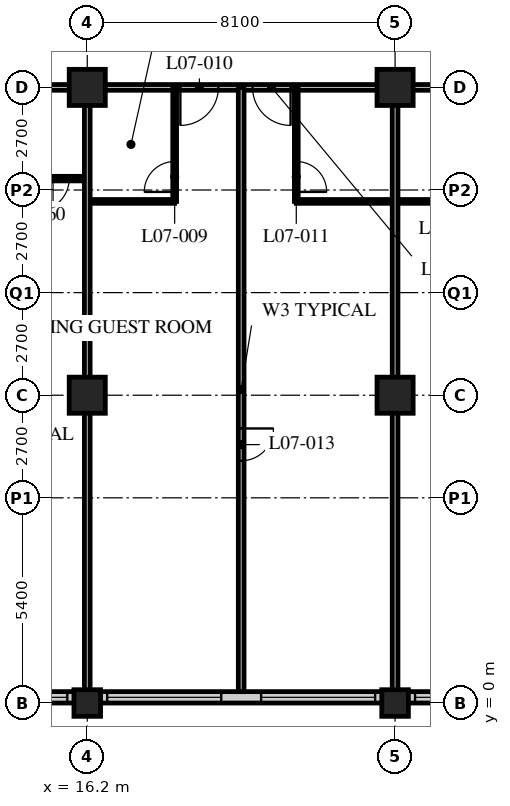
"""IFC4 building model, lengths in metres.
Left out: names, types, materials, properties, quantities, classifications, styles, units other than length and angle.
Written with IfcOpenShell. Run it as: python <this file> out.ifc"""

import sys

from ifc_helpers import new_model, si_unit, direction, frame, frame_2d, origin, origin_2d, place, context, subcontext, project, spatial, rectangle, hollow_rectangle, extrude, element, fill, save


model = new_model("IFC4")
c1 = context("Model", 3, precision=1e-05, world=origin(), true_north=direction((0.0, 1.0)))
c2 = subcontext(c1, "Body", "Model", "MODEL_VIEW")
j1 = project(units=[si_unit("LENGTHUNIT", "METRE"), si_unit("PLANEANGLEUNIT", "RADIAN")], contexts=[c1])
p1 = place(None, origin())
s1 = spatial("IfcSite", under=j1, at=p1, CompositionType="ELEMENT")
p2 = place(p1, origin())
s2 = spatial("IfcBuilding", under=s1, at=p2, CompositionType="ELEMENT")
p3 = place(p2, frame((0.0, 0.0, 36.4)))
s3 = spatial("IfcBuildingStorey", under=s2, at=p3, CompositionType="ELEMENT", Elevation=36.4)
p4 = place(p3, frame((16.2, 0.0, 0.0), z_axis=(0.0, 0.0, 1.0), x_axis=(1.0, 0.0, 0.0)))
e1 = element("IfcColumn", 1, at=p4, inside=s3, PredefinedType="COLUMN", context=c2, shape_type="SweptSolid", body=[
    extrude(hollow_rectangle(XDim=0.7, YDim=0.7, WallThickness=0.06, at=origin_2d()), origin(), (0.0, 0.0, 1.0), 3.4),
])
for number, where, z_axis, x_axis in (
    (2, (16.2, 8.1, 0.0), (0.0, 0.0, 1.0), (1.0, 0.0, 0.0)),
    (3, (16.2, 16.2, 0.0), (0.0, 0.0, 1.0), (1.0, 0.0, 0.0)),
):
    element("IfcColumn", number, at=place(p3, frame(where, z_axis=z_axis, x_axis=x_axis)), inside=s3, PredefinedType="COLUMN", context=c2, shape_type="SweptSolid", body=[
        extrude(hollow_rectangle(XDim=0.95, YDim=0.95, WallThickness=0.095, at=origin_2d()), origin(), (0.0, 0.0, 1.0), 3.4),
    ])
p5 = place(p3, frame((24.3, 0.0, 0.0), z_axis=(0.0, 0.0, 1.0), x_axis=(1.0, 0.0, 0.0)))
e4 = element("IfcColumn", 4, at=p5, inside=s3, PredefinedType="COLUMN", context=c2, shape_type="SweptSolid", body=[
    extrude(hollow_rectangle(XDim=0.7, YDim=0.7, WallThickness=0.06, at=origin_2d()), origin(), (0.0, 0.0, 1.0), 3.4),
])
for number, where, z_axis, x_axis in (
    (5, (24.3, 8.1, 0.0), (0.0, 0.0, 1.0), (1.0, 0.0, 0.0)),
    (6, (24.3, 16.2, 0.0), (0.0, 0.0, 1.0), (1.0, 0.0, 0.0)),
):
    element("IfcColumn", number, at=place(p3, frame(where, z_axis=z_axis, x_axis=x_axis)), inside=s3, PredefinedType="COLUMN", context=c2, shape_type="SweptSolid", body=[
        extrude(hollow_rectangle(XDim=0.95, YDim=0.95, WallThickness=0.095, at=origin_2d()), origin(), (0.0, 0.0, 1.0), 3.4),
    ])
p6 = place(p3, frame((8.4, 0.15, 0.0), z_axis=(0.0, 0.0, 1.0), x_axis=(1.0, 0.0, 0.0)))
e7 = element("IfcWall", 7, at=p6, inside=s3, PredefinedType="SOLIDWALL", context=c2, shape_type="SweptSolid", body=[
    extrude(rectangle(XDim=40.2, YDim=0.3, at=frame_2d((20.1, 0.0))), origin(), (0.0, 0.0, 1.0), 3.19),
])
p7 = place(p6, frame((0.225, 0.0, 0.9)))
e8 = element("IfcOpeningElement", 8, at=p7, cuts=e7, PredefinedType="OPENING", context=c2, shape_type="SweptSolid", body=[
    extrude(rectangle(XDim=3.0, YDim=2.0, at=frame_2d((1.5, 1.0))), frame((0.0, 0.16, 0.0), z_axis=(0.0, -1.0, 0.0), x_axis=(1.0, 0.0, 0.0)), (0.0, 0.0, 1.0), 0.32),
])
p8 = place(p6, frame((4.275, 0.0, 0.9)))
e9 = element("IfcOpeningElement", 9, at=p8, cuts=e7, PredefinedType="OPENING", context=c2, shape_type="SweptSolid", body=[
    extrude(rectangle(XDim=3.0, YDim=2.0, at=frame_2d((1.5, 1.0))), frame((0.0, 0.16, 0.0), z_axis=(0.0, -1.0, 0.0), x_axis=(1.0, 0.0, 0.0)), (0.0, 0.0, 1.0), 0.32),
])
p9 = place(p6, frame((8.325, 0.0, 0.9)))
e10 = element("IfcOpeningElement", 10, at=p9, cuts=e7, PredefinedType="OPENING", context=c2, shape_type="SweptSolid", body=[
    extrude(rectangle(XDim=3.0, YDim=2.0, at=frame_2d((1.5, 1.0))), frame((0.0, 0.16, 0.0), z_axis=(0.0, -1.0, 0.0), x_axis=(1.0, 0.0, 0.0)), (0.0, 0.0, 1.0), 0.32),
])
p10 = place(p6, frame((12.375, 0.0, 0.9)))
e11 = element("IfcOpeningElement", 11, at=p10, cuts=e7, PredefinedType="OPENING", context=c2, shape_type="SweptSolid", body=[
    extrude(rectangle(XDim=3.0, YDim=2.0, at=frame_2d((1.5, 1.0))), frame((0.0, 0.16, 0.0), z_axis=(0.0, -1.0, 0.0), x_axis=(1.0, 0.0, 0.0)), (0.0, 0.0, 1.0), 0.32),
])
p11 = place(p6, frame((16.425, 0.0, 0.9)))
e12 = element("IfcOpeningElement", 12, at=p11, cuts=e7, PredefinedType="OPENING", context=c2, shape_type="SweptSolid", body=[
    extrude(rectangle(XDim=3.0, YDim=2.0, at=frame_2d((1.5, 1.0))), frame((0.0, 0.16, 0.0), z_axis=(0.0, -1.0, 0.0), x_axis=(1.0, 0.0, 0.0)), (0.0, 0.0, 1.0), 0.32),
])
p12 = place(p6, frame((20.475, 0.0, 0.9)))
e13 = element("IfcOpeningElement", 13, at=p12, cuts=e7, PredefinedType="OPENING", context=c2, shape_type="SweptSolid", body=[
    extrude(rectangle(XDim=3.0, YDim=2.0, at=frame_2d((1.5, 1.0))), frame((0.0, 0.16, 0.0), z_axis=(0.0, -1.0, 0.0), x_axis=(1.0, 0.0, 0.0)), (0.0, 0.0, 1.0), 0.32),
])
p13 = place(p6, frame((24.525, 0.0, 0.9)))
e14 = element("IfcOpeningElement", 14, at=p13, cuts=e7, PredefinedType="OPENING", context=c2, shape_type="SweptSolid", body=[
    extrude(rectangle(XDim=3.0, YDim=2.0, at=frame_2d((1.5, 1.0))), frame((0.0, 0.16, 0.0), z_axis=(0.0, -1.0, 0.0), x_axis=(1.0, 0.0, 0.0)), (0.0, 0.0, 1.0), 0.32),
])
p14 = place(p6, frame((28.575, 0.0, 0.9)))
e15 = element("IfcOpeningElement", 15, at=p14, cuts=e7, PredefinedType="OPENING", context=c2, shape_type="SweptSolid", body=[
    extrude(rectangle(XDim=3.0, YDim=2.0, at=frame_2d((1.5, 1.0))), frame((0.0, 0.16, 0.0), z_axis=(0.0, -1.0, 0.0), x_axis=(1.0, 0.0, 0.0)), (0.0, 0.0, 1.0), 0.32),
])
p15 = place(p6, frame((32.625, 0.0, 0.9)))
e16 = element("IfcOpeningElement", 16, at=p15, cuts=e7, PredefinedType="OPENING", context=c2, shape_type="SweptSolid", body=[
    extrude(rectangle(XDim=3.0, YDim=2.0, at=frame_2d((1.5, 1.0))), frame((0.0, 0.16, 0.0), z_axis=(0.0, -1.0, 0.0), x_axis=(1.0, 0.0, 0.0)), (0.0, 0.0, 1.0), 0.32),
])
p16 = place(p6, frame((36.675, 0.0, 0.9)))
e17 = element("IfcOpeningElement", 17, at=p16, cuts=e7, PredefinedType="OPENING", context=c2, shape_type="SweptSolid", body=[
    extrude(rectangle(XDim=3.0, YDim=2.0, at=frame_2d((1.5, 1.0))), frame((0.0, 0.16, 0.0), z_axis=(0.0, -1.0, 0.0), x_axis=(1.0, 0.0, 0.0)), (0.0, 0.0, 1.0), 0.32),
])
p17 = place(p3, frame((12.15, 16.2, 0.0), z_axis=(0.0, 0.0, 1.0), x_axis=(1.0, 0.0, 0.0)))
e18 = element("IfcWall", 18, at=p17, inside=s3, PredefinedType="PARTITIONING", context=c2, shape_type="SweptSolid", body=[
    extrude(rectangle(XDim=32.4, YDim=0.15, at=frame_2d((16.2, 0.0))), origin(), (0.0, 0.0, 1.0), 2.578),
])
p18 = place(p17, frame((6.5, 0.0, 0.0)))
e19 = element("IfcOpeningElement", 19, at=p18, cuts=e18, PredefinedType="OPENING", context=c2, shape_type="SweptSolid", body=[
    extrude(rectangle(XDim=1.0, YDim=2.1, at=frame_2d((0.5, 1.05))), frame((0.0, 0.085, 0.0), z_axis=(0.0, -1.0, 0.0), x_axis=(1.0, 0.0, 0.0)), (0.0, 0.0, 1.0), 0.17),
])
p19 = place(p17, frame((8.4, 0.0, 0.0)))
e20 = element("IfcOpeningElement", 20, at=p19, cuts=e18, PredefinedType="OPENING", context=c2, shape_type="SweptSolid", body=[
    extrude(rectangle(XDim=1.0, YDim=2.1, at=frame_2d((0.5, 1.05))), frame((0.0, 0.085, 0.0), z_axis=(0.0, -1.0, 0.0), x_axis=(1.0, 0.0, 0.0)), (0.0, 0.0, 1.0), 0.17),
])
p20 = place(p17, frame((14.6, 0.0, 0.0)))
e21 = element("IfcOpeningElement", 21, at=p20, cuts=e18, PredefinedType="OPENING", context=c2, shape_type="SweptSolid", body=[
    extrude(rectangle(XDim=1.0, YDim=2.1, at=frame_2d((0.5, 1.05))), frame((0.0, 0.085, 0.0), z_axis=(0.0, -1.0, 0.0), x_axis=(1.0, 0.0, 0.0)), (0.0, 0.0, 1.0), 0.17),
])
p21 = place(p17, frame((16.5, 0.0, 0.0)))
e22 = element("IfcOpeningElement", 22, at=p21, cuts=e18, PredefinedType="OPENING", context=c2, shape_type="SweptSolid", body=[
    extrude(rectangle(XDim=1.0, YDim=2.1, at=frame_2d((0.5, 1.05))), frame((0.0, 0.085, 0.0), z_axis=(0.0, -1.0, 0.0), x_axis=(1.0, 0.0, 0.0)), (0.0, 0.0, 1.0), 0.17),
])
p22 = place(p17, frame((23.0, 0.0, 0.0)))
e23 = element("IfcOpeningElement", 23, at=p22, cuts=e18, PredefinedType="OPENING", context=c2, shape_type="SweptSolid", body=[
    extrude(rectangle(XDim=1.0, YDim=2.1, at=frame_2d((0.5, 1.05))), frame((0.0, 0.085, 0.0), z_axis=(0.0, -1.0, 0.0), x_axis=(1.0, 0.0, 0.0)), (0.0, 0.0, 1.0), 0.17),
])
p23 = place(p17, frame((24.6, 0.0, 0.0)))
e24 = element("IfcOpeningElement", 24, at=p23, cuts=e18, PredefinedType="OPENING", context=c2, shape_type="SweptSolid", body=[
    extrude(rectangle(XDim=1.0, YDim=2.1, at=frame_2d((0.5, 1.05))), frame((0.0, 0.085, 0.0), z_axis=(0.0, -1.0, 0.0), x_axis=(1.0, 0.0, 0.0)), (0.0, 0.0, 1.0), 0.17),
])
p24 = place(p17, frame((1.525, 0.0, 0.0)))
e25 = element("IfcOpeningElement", 25, at=p24, cuts=e18, PredefinedType="OPENING", context=c2, shape_type="SweptSolid", body=[
    extrude(rectangle(XDim=1.0, YDim=2.1, at=frame_2d((0.5, 1.05))), frame((0.0, 0.085, 0.0), z_axis=(0.0, -1.0, 0.0), x_axis=(1.0, 0.0, 0.0)), (0.0, 0.0, 1.0), 0.17),
])
p25 = place(p17, frame((29.875, 0.0, 0.0)))
e26 = element("IfcOpeningElement", 26, at=p25, cuts=e18, PredefinedType="OPENING", context=c2, shape_type="SweptSolid", body=[
    extrude(rectangle(XDim=1.0, YDim=2.1, at=frame_2d((0.5, 1.05))), frame((0.0, 0.085, 0.0), z_axis=(0.0, -1.0, 0.0), x_axis=(1.0, 0.0, 0.0)), (0.0, 0.0, 1.0), 0.17),
])
p26 = place(p3, frame((16.2, 13.2, 0.0), z_axis=(0.0, 0.0, 1.0), x_axis=(1.0, 0.0, 0.0)))
e27 = element("IfcWall", 27, at=p26, inside=s3, PredefinedType="PARTITIONING", context=c2, shape_type="SweptSolid", body=[
    extrude(rectangle(XDim=2.3, YDim=0.1, at=frame_2d((1.15, 0.0))), origin(), (0.0, 0.0, 1.0), 3.19),
])
p27 = place(p3, frame((18.5, 16.2, 0.0), z_axis=(0.0, 0.0, 1.0), x_axis=(0.0, -1.0, 0.0)))
e28 = element("IfcWall", 28, at=p27, inside=s3, PredefinedType="PARTITIONING", context=c2, shape_type="SweptSolid", body=[
    extrude(rectangle(XDim=3.0, YDim=0.1, at=frame_2d((1.5, 0.0))), origin(), (0.0, 0.0, 1.0), 3.19),
])
p28 = place(p27, frame((1.95, 0.0, 0.0)))
e29 = element("IfcOpeningElement", 29, at=p28, cuts=e28, PredefinedType="OPENING", context=c2, shape_type="SweptSolid", body=[
    extrude(rectangle(XDim=0.8, YDim=2.1, at=frame_2d((0.4, 1.05))), frame((0.0, 0.06, 0.0), z_axis=(0.0, -1.0, 0.0), x_axis=(1.0, 0.0, 0.0)), (0.0, 0.0, 1.0), 0.12),
])
p29 = place(p3, frame((21.7, 13.2, 0.0), z_axis=(0.0, 0.0, 1.0), x_axis=(1.0, 0.0, 0.0)))
e30 = element("IfcWall", 30, at=p29, inside=s3, PredefinedType="PARTITIONING", context=c2, shape_type="SweptSolid", body=[
    extrude(rectangle(XDim=4.9, YDim=0.1, at=frame_2d((2.45, 0.0))), origin(), (0.0, 0.0, 1.0), 3.19),
])
p30 = place(p3, frame((21.7, 16.2, 0.0), z_axis=(0.0, 0.0, 1.0), x_axis=(0.0, -1.0, 0.0)))
e31 = element("IfcWall", 31, at=p30, inside=s3, PredefinedType="PARTITIONING", context=c2, shape_type="SweptSolid", body=[
    extrude(rectangle(XDim=3.0, YDim=0.1, at=frame_2d((1.5, 0.0))), origin(), (0.0, 0.0, 1.0), 3.19),
])
p31 = place(p30, frame((1.95, 0.0, 0.0)))
e32 = element("IfcOpeningElement", 32, at=p31, cuts=e31, PredefinedType="OPENING", context=c2, shape_type="SweptSolid", body=[
    extrude(rectangle(XDim=0.8, YDim=2.1, at=frame_2d((0.4, 1.05))), frame((0.0, 0.06, 0.0), z_axis=(0.0, -1.0, 0.0), x_axis=(1.0, 0.0, 0.0)), (0.0, 0.0, 1.0), 0.12),
])
p32 = place(p3, frame((20.25, 16.2, 0.0), z_axis=(0.0, 0.0, 1.0), x_axis=(0.0, -1.0, 0.0)))
e33 = element("IfcWall", 33, at=p32, inside=s3, PredefinedType="PARTITIONING", context=c2, shape_type="SweptSolid", body=[
    extrude(rectangle(XDim=15.9, YDim=0.15, at=frame_2d((7.95, 0.0))), origin(), (0.0, 0.0, 1.0), 3.19),
])
p33 = place(p32, frame((8.975, 0.0, 0.0)))
e34 = element("IfcOpeningElement", 34, at=p33, cuts=e33, PredefinedType="OPENING", context=c2, shape_type="SweptSolid", body=[
    extrude(rectangle(XDim=0.85, YDim=2.1, at=frame_2d((0.425, 1.05))), frame((0.0, 0.085, 0.0), z_axis=(0.0, -1.0, 0.0), x_axis=(1.0, 0.0, 0.0)), (0.0, 0.0, 1.0), 0.17),
])
p34 = place(p3, frame((24.3, 16.2, 0.0), z_axis=(0.0, 0.0, 1.0), x_axis=(0.0, -1.0, 0.0)))
e35 = element("IfcWall", 35, at=p34, inside=s3, PredefinedType="PARTITIONING", context=c2, shape_type="SweptSolid", body=[
    extrude(rectangle(XDim=15.9, YDim=0.15, at=frame_2d((7.95, 0.0))), origin(), (0.0, 0.0, 1.0), 2.578),
])
p35 = place(p3, frame((8.15, 13.8, 0.0), z_axis=(0.0, 0.0, 1.0), x_axis=(1.0, 0.0, 0.0)))
e36 = element("IfcWall", 36, at=p35, inside=s3, PredefinedType="PARTITIONING", context=c2, shape_type="SweptSolid", body=[
    extrude(rectangle(XDim=8.05, YDim=0.12, at=frame_2d((4.025, 0.0))), origin(), (0.0, 0.0, 1.0), 3.19),
])
p36 = place(p35, frame((6.725, 0.0, 0.0)))
e37 = element("IfcOpeningElement", 37, at=p36, cuts=e36, PredefinedType="OPENING", context=c2, shape_type="SweptSolid", body=[
    extrude(rectangle(XDim=0.85, YDim=2.1, at=frame_2d((0.425, 1.05))), frame((0.0, 0.07, 0.0), z_axis=(0.0, -1.0, 0.0), x_axis=(1.0, 0.0, 0.0)), (0.0, 0.0, 1.0), 0.14),
])
p37 = place(p35, frame((2.875, 0.0, 0.0)))
e38 = element("IfcOpeningElement", 38, at=p37, cuts=e36, PredefinedType="OPENING", context=c2, shape_type="SweptSolid", body=[
    extrude(rectangle(XDim=0.85, YDim=2.1, at=frame_2d((0.425, 1.05))), frame((0.0, 0.07, 0.0), z_axis=(0.0, -1.0, 0.0), x_axis=(1.0, 0.0, 0.0)), (0.0, 0.0, 1.0), 0.14),
])
p38 = place(p3, frame((16.2, 16.2, 0.0), z_axis=(0.0, 0.0, 1.0), x_axis=(0.0, -1.0, 0.0)))
e39 = element("IfcWall", 39, at=p38, inside=s3, PredefinedType="PARTITIONING", context=c2, shape_type="SweptSolid", body=[
    extrude(rectangle(XDim=15.9, YDim=0.15, at=frame_2d((7.95, 0.0))), origin(), (0.0, 0.0, 1.0), 2.578),
])
p39 = place(p8, origin())
e40 = element("IfcWindow", 40, at=p39, inside=s3, PartitioningType="SINGLE_PANEL", PredefinedType="WINDOW", context=c2, shape_type="SweptSolid", body=[
    extrude(rectangle(XDim=3.0, YDim=2.0, at=frame_2d((1.5, 1.0))), frame((0.0, 0.03, 0.0), z_axis=(0.0, -1.0, 0.0), x_axis=(1.0, 0.0, 0.0)), (0.0, 0.0, 1.0), 0.06),
])
fill(e9, e40)
p40 = place(p9, origin())
e41 = element("IfcWindow", 41, at=p40, inside=s3, PartitioningType="SINGLE_PANEL", PredefinedType="WINDOW", context=c2, shape_type="SweptSolid", body=[
    extrude(rectangle(XDim=3.0, YDim=2.0, at=frame_2d((1.5, 1.0))), frame((0.0, 0.03, 0.0), z_axis=(0.0, -1.0, 0.0), x_axis=(1.0, 0.0, 0.0)), (0.0, 0.0, 1.0), 0.06),
])
fill(e10, e41)
p41 = place(p10, origin())
e42 = element("IfcWindow", 42, at=p41, inside=s3, PartitioningType="SINGLE_PANEL", PredefinedType="WINDOW", context=c2, shape_type="SweptSolid", body=[
    extrude(rectangle(XDim=3.0, YDim=2.0, at=frame_2d((1.5, 1.0))), frame((0.0, 0.03, 0.0), z_axis=(0.0, -1.0, 0.0), x_axis=(1.0, 0.0, 0.0)), (0.0, 0.0, 1.0), 0.06),
])
fill(e11, e42)
p42 = place(p11, origin())
e43 = element("IfcWindow", 43, at=p42, inside=s3, PartitioningType="SINGLE_PANEL", PredefinedType="WINDOW", context=c2, shape_type="SweptSolid", body=[
    extrude(rectangle(XDim=3.0, YDim=2.0, at=frame_2d((1.5, 1.0))), frame((0.0, 0.03, 0.0), z_axis=(0.0, -1.0, 0.0), x_axis=(1.0, 0.0, 0.0)), (0.0, 0.0, 1.0), 0.06),
])
fill(e12, e43)
p43 = place(p28, origin())
e44 = element("IfcDoor", 44, at=p43, inside=s3, OperationType="SINGLE_SWING_LEFT", PredefinedType="DOOR", context=c2, shape_type="SweptSolid", body=[
    extrude(rectangle(XDim=0.8, YDim=2.1, at=frame_2d((0.4, 1.05))), frame((0.0, 0.025, 0.0), z_axis=(0.0, -1.0, 0.0), x_axis=(1.0, 0.0, 0.0)), (0.0, 0.0, 1.0), 0.05),
])
fill(e29, e44)
p44 = place(p18, origin())
e45 = element("IfcDoor", 45, at=p44, inside=s3, OperationType="SINGLE_SWING_RIGHT", PredefinedType="DOOR", context=c2, shape_type="SweptSolid", body=[
    extrude(rectangle(XDim=1.0, YDim=2.1, at=frame_2d((0.5, 1.05))), frame((0.0, 0.025, 0.0), z_axis=(0.0, -1.0, 0.0), x_axis=(1.0, 0.0, 0.0)), (0.0, 0.0, 1.0), 0.05),
])
fill(e19, e45)
p45 = place(p31, origin())
e46 = element("IfcDoor", 46, at=p45, inside=s3, OperationType="SINGLE_SWING_RIGHT", PredefinedType="DOOR", context=c2, shape_type="SweptSolid", body=[
    extrude(rectangle(XDim=0.8, YDim=2.1, at=frame_2d((0.4, 1.05))), frame((0.0, 0.025, 0.0), z_axis=(0.0, -1.0, 0.0), x_axis=(1.0, 0.0, 0.0)), (0.0, 0.0, 1.0), 0.05),
])
fill(e32, e46)
p46 = place(p19, origin())
e47 = element("IfcDoor", 47, at=p46, inside=s3, OperationType="SINGLE_SWING_LEFT", PredefinedType="DOOR", context=c2, shape_type="SweptSolid", body=[
    extrude(rectangle(XDim=1.0, YDim=2.1, at=frame_2d((0.5, 1.05))), frame((0.0, 0.025, 0.0), z_axis=(0.0, -1.0, 0.0), x_axis=(1.0, 0.0, 0.0)), (0.0, 0.0, 1.0), 0.05),
])
fill(e20, e47)
p47 = place(p33, origin())
e48 = element("IfcDoor", 48, at=p47, inside=s3, OperationType="SINGLE_SWING_LEFT", PredefinedType="DOOR", context=c2, shape_type="SweptSolid", body=[
    extrude(rectangle(XDim=0.85, YDim=2.1, at=frame_2d((0.425, 1.05))), frame((0.0, 0.025, 0.0), z_axis=(0.0, -1.0, 0.0), x_axis=(1.0, 0.0, 0.0)), (0.0, 0.0, 1.0), 0.05),
])
fill(e34, e48)
p48 = place(p36, origin())
e49 = element("IfcDoor", 49, at=p48, inside=s3, OperationType="SINGLE_SWING_RIGHT", PredefinedType="DOOR", context=c2, shape_type="SweptSolid", body=[
    extrude(rectangle(XDim=0.85, YDim=2.1, at=frame_2d((0.425, 1.05))), frame((0.0, 0.025, 0.0), z_axis=(0.0, -1.0, 0.0), x_axis=(1.0, 0.0, 0.0)), (0.0, 0.0, 1.0), 0.05),
])
fill(e37, e49)
save(model, sys.argv[1])
